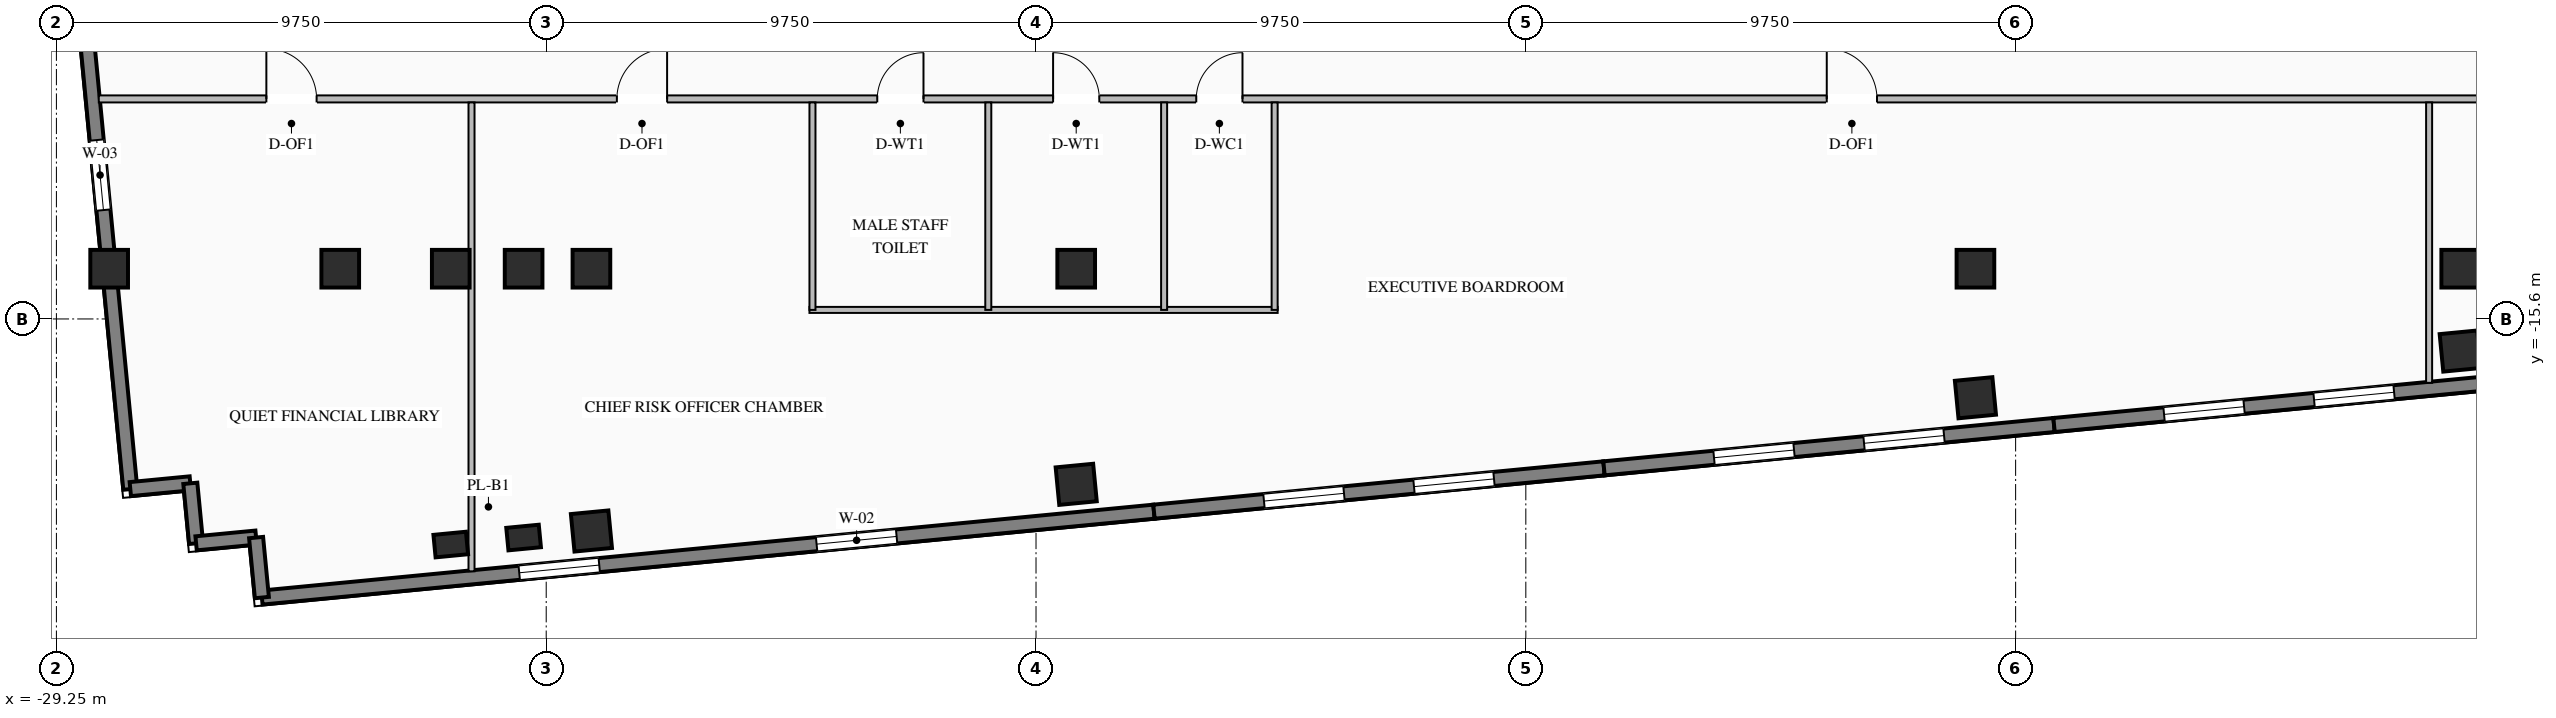
"""IFC4 building model, lengths in metres.
Left out: names, types, materials, properties, quantities, classifications, styles, units other than length and angle.
Written with IfcOpenShell. Run it as: python <this file> out.ifc"""

import sys

from ifc_helpers import new_model, si_unit, direction, frame, frame_2d, origin, origin_2d, place, context, subcontext, project, spatial, rectangle, i_section, extrude, element, fill, save


model = new_model("IFC4")
c1 = context("Model", 3, precision=1e-05, world=origin(), true_north=direction((0.0, 1.0)))
c2 = subcontext(c1, "Body", "Model", "MODEL_VIEW")
j1 = project(units=[si_unit("LENGTHUNIT", "METRE"), si_unit("PLANEANGLEUNIT", "RADIAN")], contexts=[c1])
p1 = place(None, origin())
s1 = spatial("IfcSite", under=j1, at=p1, CompositionType="ELEMENT")
p2 = place(p1, origin())
s2 = spatial("IfcBuilding", under=s1, at=p2, CompositionType="ELEMENT")
p3 = place(p2, frame((0.0, 0.0, 74.2)))
s3 = spatial("IfcBuildingStorey", under=s2, at=p3, CompositionType="ELEMENT", Elevation=74.2)
for number, where, z_axis, x_axis in (
    (1, (-21.4, -14.6, 0.0), (0.0, 0.0, 1.0), (1.0, 0.0, 0.0)),
    (2, (-19.95, -14.6, 0.0), (0.0, 0.0, 1.0), (1.0, 0.0, 0.0)),
    (3, (-18.6, -14.6, 0.0), (0.0, 0.0, 1.0), (1.0, 0.0, 0.0)),
    (4, (-8.95, -14.6, 0.0), (0.0, 0.0, 1.0), (1.0, 0.0, 0.0)),
    (5, (8.95, -14.6, 0.0), (0.0, 0.0, 1.0), (1.0, 0.0, 0.0)),
    (6, (18.6, -14.6, 0.0), (0.0, 0.0, 1.0), (1.0, 0.0, 0.0)),
    (7, (-23.6, -14.6, 0.0), (0.0, 0.0, 1.0), (1.0, 0.0, 0.0)),
    (8, (-28.2, -14.6, 0.0), (0.0, 0.0, 1.0), (1.0, 0.0, 0.0)),
    (9, (-18.6, -19.821, 0.0), (0.0, 0.0, 1.0), (0.995, 0.096, 0.0)),
    (10, (-8.95, -18.892, 0.0), (0.0, 0.0, 1.0), (0.995, 0.096, 0.0)),
    (11, (8.95, -17.168, 0.0), (0.0, 0.0, 1.0), (0.995, 0.096, 0.0)),
    (12, (18.6, -16.239, 0.0), (0.0, 0.0, 1.0), (0.995, 0.096, 0.0)),
):
    element("IfcColumn", number, at=place(p3, frame(where, z_axis=z_axis, x_axis=x_axis)), inside=s3, PredefinedType="COLUMN", context=c2, shape_type="SweptSolid", body=[
        extrude(i_section(OverallWidth=0.75, OverallDepth=0.75, WebThickness=0.03, FlangeThickness=0.044, at=origin_2d()), origin(), (0.0, 0.0, 1.0), 3.45),
    ])
for number, where, z_axis, x_axis in (
    (13, (-21.4, -20.091, 0.0), (0.0, 0.0, 1.0), (0.995, 0.096, 0.0)),
    (14, (-19.95, -19.951, 0.0), (0.0, 0.0, 1.0), (0.995, 0.096, 0.0)),
):
    element("IfcColumn", number, at=place(p3, frame(where, z_axis=z_axis, x_axis=x_axis)), inside=s3, PredefinedType="PILASTER", context=c2, shape_type="SweptSolid", body=[
        extrude(rectangle(XDim=0.65, YDim=0.45, at=origin_2d()), origin(), (0.0, 0.0, 1.0), 3.45),
    ])
p4 = place(p3, frame((-7.402, -19.436, 0.0), z_axis=(0.0, 0.0, 1.0), x_axis=(-0.995395780835, -0.095850088663, 0.0)))
e15 = element("IfcWall", 15, at=p4, inside=s3, PredefinedType="STANDARD", context=c2, shape_type="SweptSolid", body=[
    extrude(rectangle(XDim=17.84, YDim=0.28, at=frame_2d((8.92, 0.0))), origin(), (0.0, 0.0, 1.0), 3.25),
])
p5 = place(p4, frame((5.147, 0.0, 0.76)))
e16 = element("IfcOpeningElement", 16, at=p5, cuts=e15, PredefinedType="OPENING", context=c2, shape_type="SweptSolid", body=[
    extrude(rectangle(XDim=1.6, YDim=1.95, at=frame_2d((0.8, 0.975))), frame((0.0, 0.15, 0.0), z_axis=(0.0, -1.0, 0.0), x_axis=(1.0, 0.0, 0.0)), (0.0, 0.0, 1.0), 0.3),
])
p6 = place(p4, frame((11.093, 0.0, 0.76)))
e17 = element("IfcOpeningElement", 17, at=p6, cuts=e15, PredefinedType="OPENING", context=c2, shape_type="SweptSolid", body=[
    extrude(rectangle(XDim=1.6, YDim=1.95, at=frame_2d((0.8, 0.975))), frame((0.0, 0.15, 0.0), z_axis=(0.0, -1.0, 0.0), x_axis=(1.0, 0.0, 0.0)), (0.0, 0.0, 1.0), 0.3),
])
p7 = place(p3, frame((1.556, -18.573, 0.0), z_axis=(0.0, 0.0, 1.0), x_axis=(-0.995396794462, -0.09583956164, 0.0)))
e18 = element("IfcWall", 18, at=p7, inside=s3, PredefinedType="STANDARD", context=c2, shape_type="SweptSolid", body=[
    extrude(rectangle(XDim=9.0, YDim=0.28, at=frame_2d((4.5, 0.0))), origin(), (0.0, 0.0, 1.0), 3.25),
])
p8 = place(p7, frame((2.2, 0.0, 0.76)))
e19 = element("IfcOpeningElement", 19, at=p8, cuts=e18, PredefinedType="OPENING", context=c2, shape_type="SweptSolid", body=[
    extrude(rectangle(XDim=1.6, YDim=1.95, at=frame_2d((0.8, 0.975))), frame((0.0, 0.15, 0.0), z_axis=(0.0, -1.0, 0.0), x_axis=(1.0, 0.0, 0.0)), (0.0, 0.0, 1.0), 0.3),
])
p9 = place(p7, frame((5.2, 0.0, 0.76)))
e20 = element("IfcOpeningElement", 20, at=p9, cuts=e18, PredefinedType="OPENING", context=c2, shape_type="SweptSolid", body=[
    extrude(rectangle(XDim=1.6, YDim=1.95, at=frame_2d((0.8, 0.975))), frame((0.0, 0.15, 0.0), z_axis=(0.0, -1.0, 0.0), x_axis=(1.0, 0.0, 0.0)), (0.0, 0.0, 1.0), 0.3),
])
p10 = place(p3, frame((10.515, -17.711, 0.0), z_axis=(0.0, 0.0, 1.0), x_axis=(-0.995397043619, -0.095836973841, 0.0)))
e21 = element("IfcWall", 21, at=p10, inside=s3, PredefinedType="STANDARD", context=c2, shape_type="SweptSolid", body=[
    extrude(rectangle(XDim=9.0, YDim=0.28, at=frame_2d((4.5, 0.0))), origin(), (0.0, 0.0, 1.0), 3.25),
])
p11 = place(p10, frame((2.2, 0.0, 0.76)))
e22 = element("IfcOpeningElement", 22, at=p11, cuts=e21, PredefinedType="OPENING", context=c2, shape_type="SweptSolid", body=[
    extrude(rectangle(XDim=1.6, YDim=1.95, at=frame_2d((0.8, 0.975))), frame((0.0, 0.15, 0.0), z_axis=(0.0, -1.0, 0.0), x_axis=(1.0, 0.0, 0.0)), (0.0, 0.0, 1.0), 0.3),
])
p12 = place(p10, frame((5.2, 0.0, 0.76)))
e23 = element("IfcOpeningElement", 23, at=p12, cuts=e21, PredefinedType="OPENING", context=c2, shape_type="SweptSolid", body=[
    extrude(rectangle(XDim=1.6, YDim=1.95, at=frame_2d((0.8, 0.975))), frame((0.0, 0.15, 0.0), z_axis=(0.0, -1.0, 0.0), x_axis=(1.0, 0.0, 0.0)), (0.0, 0.0, 1.0), 0.3),
])
p13 = place(p3, frame((19.474, -16.848, 0.0), z_axis=(0.0, 0.0, 1.0), x_axis=(-0.995396794462, -0.09583956164, 0.0)))
e24 = element("IfcWall", 24, at=p13, inside=s3, PredefinedType="STANDARD", context=c2, shape_type="SweptSolid", body=[
    extrude(rectangle(XDim=9.0, YDim=0.28, at=frame_2d((4.5, 0.0))), origin(), (0.0, 0.0, 1.0), 3.25),
])
p14 = place(p13, frame((2.2, 0.0, 0.76)))
e25 = element("IfcOpeningElement", 25, at=p14, cuts=e24, PredefinedType="OPENING", context=c2, shape_type="SweptSolid", body=[
    extrude(rectangle(XDim=1.6, YDim=1.95, at=frame_2d((0.8, 0.975))), frame((0.0, 0.15, 0.0), z_axis=(0.0, -1.0, 0.0), x_axis=(1.0, 0.0, 0.0)), (0.0, 0.0, 1.0), 0.3),
])
p15 = place(p13, frame((5.2, 0.0, 0.76)))
e26 = element("IfcOpeningElement", 26, at=p15, cuts=e24, PredefinedType="OPENING", context=c2, shape_type="SweptSolid", body=[
    extrude(rectangle(XDim=1.6, YDim=1.95, at=frame_2d((0.8, 0.975))), frame((0.0, 0.15, 0.0), z_axis=(0.0, -1.0, 0.0), x_axis=(1.0, 0.0, 0.0)), (0.0, 0.0, 1.0), 0.3),
])
p16 = place(p3, frame((-27.779, -18.987, 0.0), z_axis=(0.0, 0.0, 1.0), x_axis=(-0.095842534142, 0.995396508256, 0.0)))
e27 = element("IfcWall", 27, at=p16, inside=s3, PredefinedType="STANDARD", context=c2, shape_type="SweptSolid", body=[
    extrude(rectangle(XDim=18.84, YDim=0.28, at=frame_2d((9.42, 0.0))), origin(), (0.0, 0.0, 1.0), 3.25),
])
p17 = place(p16, frame((5.58, 0.0, 0.76)))
e28 = element("IfcOpeningElement", 28, at=p17, cuts=e27, PredefinedType="OPENING", context=c2, shape_type="SweptSolid", body=[
    extrude(rectangle(XDim=1.4, YDim=1.95, at=frame_2d((0.7, 0.975))), frame((0.0, 0.15, 0.0), z_axis=(0.0, -1.0, 0.0), x_axis=(1.0, 0.0, 0.0)), (0.0, 0.0, 1.0), 0.3),
])
p18 = place(p16, frame((11.86, 0.0, 0.76)))
e29 = element("IfcOpeningElement", 29, at=p18, cuts=e27, PredefinedType="OPENING", context=c2, shape_type="SweptSolid", body=[
    extrude(rectangle(XDim=1.4, YDim=1.95, at=frame_2d((0.7, 0.975))), frame((0.0, 0.15, 0.0), z_axis=(0.0, -1.0, 0.0), x_axis=(1.0, 0.0, 0.0)), (0.0, 0.0, 1.0), 0.3),
])
for number, where, z_axis, x_axis in (
    (30, (-27.779, -18.987, 0.0), (0.0, 0.0, 1.0), (0.995, 0.096, 0.0)),
    (31, (-26.584, -18.872, 0.0), (0.0, 0.0, 1.0), (0.096, -0.995, 0.0)),
    (32, (-26.469, -20.067, 0.0), (0.0, 0.0, 1.0), (0.995, 0.096, 0.0)),
):
    element("IfcWall", number, at=place(p3, frame(where, z_axis=z_axis, x_axis=x_axis)), inside=s3, PredefinedType="STANDARD", context=c2, shape_type="SweptSolid", body=[
        extrude(rectangle(XDim=1.2, YDim=0.28, at=frame_2d((0.6, 0.0))), origin(), (0.0, 0.0, 1.0), 3.25),
    ])
p19 = place(p3, frame((-25.275, -19.952, 0.0), z_axis=(0.0, 0.0, 1.0), x_axis=(0.095836473879, -0.995397091755, 0.0)))
e33 = element("IfcWall", 33, at=p19, inside=s3, PredefinedType="STANDARD", context=c2, shape_type="SweptSolid", body=[
    extrude(rectangle(XDim=1.2, YDim=0.28, at=frame_2d((0.6, 0.0))), origin(), (0.0, 0.0, 1.0), 3.25),
])
p20 = place(p3, frame((-28.406, -11.22, 0.0), z_axis=(0.0, 0.0, 1.0), x_axis=(1.0, 0.0, 0.0)))
e34 = element("IfcWall", 34, at=p20, inside=s3, PredefinedType="STANDARD", context=c2, shape_type="SweptSolid", body=[
    extrude(rectangle(XDim=67.551, YDim=0.14, at=frame_2d((33.775, 0.0))), origin(), (0.0, 0.0, 1.0), 2.745),
])
p21 = place(p20, frame((15.496, 0.0, 0.0)))
e35 = element("IfcOpeningElement", 35, at=p21, cuts=e34, PredefinedType="OPENING", context=c2, shape_type="SweptSolid", body=[
    extrude(rectangle(XDim=0.92, YDim=2.08, at=frame_2d((0.46, 1.04))), frame((0.0, 0.08, 0.0), z_axis=(0.0, -1.0, 0.0), x_axis=(1.0, 0.0, 0.0)), (0.0, 0.0, 1.0), 0.16),
])
p22 = place(p20, frame((18.996, 0.0, 0.0)))
e36 = element("IfcOpeningElement", 36, at=p22, cuts=e34, PredefinedType="OPENING", context=c2, shape_type="SweptSolid", body=[
    extrude(rectangle(XDim=0.92, YDim=2.08, at=frame_2d((0.46, 1.04))), frame((0.0, 0.08, 0.0), z_axis=(0.0, -1.0, 0.0), x_axis=(1.0, 0.0, 0.0)), (0.0, 0.0, 1.0), 0.16),
])
p23 = place(p20, frame((21.846, 0.0, 0.0)))
e37 = element("IfcOpeningElement", 37, at=p23, cuts=e34, PredefinedType="OPENING", context=c2, shape_type="SweptSolid", body=[
    extrude(rectangle(XDim=0.92, YDim=2.08, at=frame_2d((0.46, 1.04))), frame((0.0, 0.08, 0.0), z_axis=(0.0, -1.0, 0.0), x_axis=(1.0, 0.0, 0.0)), (0.0, 0.0, 1.0), 0.16),
])
p24 = place(p20, frame((3.336, 0.0, 0.0)))
e38 = element("IfcOpeningElement", 38, at=p24, cuts=e34, PredefinedType="OPENING", context=c2, shape_type="SweptSolid", body=[
    extrude(rectangle(XDim=1.0, YDim=2.08, at=frame_2d((0.5, 1.04))), frame((0.0, 0.08, 0.0), z_axis=(0.0, -1.0, 0.0), x_axis=(1.0, 0.0, 0.0)), (0.0, 0.0, 1.0), 0.16),
])
p25 = place(p20, frame((10.313, 0.0, 0.0)))
e39 = element("IfcOpeningElement", 39, at=p25, cuts=e34, PredefinedType="OPENING", context=c2, shape_type="SweptSolid", body=[
    extrude(rectangle(XDim=1.0, YDim=2.08, at=frame_2d((0.5, 1.04))), frame((0.0, 0.08, 0.0), z_axis=(0.0, -1.0, 0.0), x_axis=(1.0, 0.0, 0.0)), (0.0, 0.0, 1.0), 0.16),
])
p26 = place(p20, frame((34.397, 0.0, 0.0)))
e40 = element("IfcOpeningElement", 40, at=p26, cuts=e34, PredefinedType="OPENING", context=c2, shape_type="SweptSolid", body=[
    extrude(rectangle(XDim=1.0, YDim=2.08, at=frame_2d((0.5, 1.04))), frame((0.0, 0.08, 0.0), z_axis=(0.0, -1.0, 0.0), x_axis=(1.0, 0.0, 0.0)), (0.0, 0.0, 1.0), 0.16),
])
p27 = place(p20, frame((56.343, 0.0, 0.0)))
e41 = element("IfcOpeningElement", 41, at=p27, cuts=e34, PredefinedType="OPENING", context=c2, shape_type="SweptSolid", body=[
    extrude(rectangle(XDim=1.0, YDim=2.08, at=frame_2d((0.5, 1.04))), frame((0.0, 0.08, 0.0), z_axis=(0.0, -1.0, 0.0), x_axis=(1.0, 0.0, 0.0)), (0.0, 0.0, 1.0), 0.16),
])
p28 = place(p3, frame((-14.26, -15.42, 0.0), z_axis=(0.0, 0.0, 1.0), x_axis=(1.0, 0.0, 0.0)))
e42 = element("IfcWall", 42, at=p28, inside=s3, PredefinedType="STANDARD", context=c2, shape_type="SweptSolid", body=[
    extrude(rectangle(XDim=9.32, YDim=0.12, at=frame_2d((4.66, 0.0))), origin(), (0.0, 0.0, 1.0), 3.25),
])
for number, where, z_axis, x_axis in (
    (43, (-14.2, -15.42, 0.0), (0.0, 0.0, 1.0), (0.0, 1.0, 0.0)),
    (44, (-10.7, -15.42, 0.0), (0.0, 0.0, 1.0), (0.0, 1.0, 0.0)),
    (45, (-7.2, -15.42, 0.0), (0.0, 0.0, 1.0), (0.0, 1.0, 0.0)),
    (46, (-5.0, -15.42, 0.0), (0.0, 0.0, 1.0), (0.0, 1.0, 0.0)),
):
    element("IfcWall", number, at=place(p3, frame(where, z_axis=z_axis, x_axis=x_axis)), inside=s3, PredefinedType="STANDARD", context=c2, shape_type="SweptSolid", body=[
        extrude(rectangle(XDim=4.13, YDim=0.12, at=frame_2d((2.065, 0.0))), origin(), (0.0, 0.0, 1.0), 3.25),
    ])
p29 = place(p3, frame((-20.987, -20.624, 0.0), z_axis=(0.0, 0.0, 1.0), x_axis=(0.0, 1.0, 0.0)))
e47 = element("IfcWall", 47, at=p29, inside=s3, PredefinedType="STANDARD", context=c2, shape_type="SweptSolid", body=[
    extrude(rectangle(XDim=9.334, YDim=0.12, at=frame_2d((4.667, 0.0))), origin(), (0.0, 0.0, 1.0), 3.25),
])
p30 = place(p3, frame((17.981, -16.872, 0.0), z_axis=(0.0, 0.0, 1.0), x_axis=(0.0, 1.0, 0.0)))
e48 = element("IfcWall", 48, at=p30, inside=s3, PredefinedType="STANDARD", context=c2, shape_type="SweptSolid", body=[
    extrude(rectangle(XDim=5.582, YDim=0.12, at=frame_2d((2.791, 0.0))), origin(), (0.0, 0.0, 1.0), 3.25),
])
p31 = place(p5, origin())
e49 = element("IfcWindow", 49, at=p31, inside=s3, PartitioningType="SINGLE_PANEL", PredefinedType="WINDOW", context=c2, shape_type="SweptSolid", body=[
    extrude(rectangle(XDim=1.6, YDim=1.95, at=frame_2d((0.8, 0.975))), frame((0.0, 0.03, 0.0), z_axis=(0.0, -1.0, 0.0), x_axis=(1.0, 0.0, 0.0)), (0.0, 0.0, 1.0), 0.06),
])
fill(e16, e49)
p32 = place(p6, origin())
e50 = element("IfcWindow", 50, at=p32, inside=s3, PartitioningType="SINGLE_PANEL", PredefinedType="WINDOW", context=c2, shape_type="SweptSolid", body=[
    extrude(rectangle(XDim=1.6, YDim=1.95, at=frame_2d((0.8, 0.975))), frame((0.0, 0.03, 0.0), z_axis=(0.0, -1.0, 0.0), x_axis=(1.0, 0.0, 0.0)), (0.0, 0.0, 1.0), 0.06),
])
fill(e17, e50)
p33 = place(p8, origin())
e51 = element("IfcWindow", 51, at=p33, inside=s3, PartitioningType="SINGLE_PANEL", PredefinedType="WINDOW", context=c2, shape_type="SweptSolid", body=[
    extrude(rectangle(XDim=1.6, YDim=1.95, at=frame_2d((0.8, 0.975))), frame((0.0, 0.03, 0.0), z_axis=(0.0, -1.0, 0.0), x_axis=(1.0, 0.0, 0.0)), (0.0, 0.0, 1.0), 0.06),
])
fill(e19, e51)
p34 = place(p9, origin())
e52 = element("IfcWindow", 52, at=p34, inside=s3, PartitioningType="SINGLE_PANEL", PredefinedType="WINDOW", context=c2, shape_type="SweptSolid", body=[
    extrude(rectangle(XDim=1.6, YDim=1.95, at=frame_2d((0.8, 0.975))), frame((0.0, 0.03, 0.0), z_axis=(0.0, -1.0, 0.0), x_axis=(1.0, 0.0, 0.0)), (0.0, 0.0, 1.0), 0.06),
])
fill(e20, e52)
p35 = place(p11, origin())
e53 = element("IfcWindow", 53, at=p35, inside=s3, PartitioningType="SINGLE_PANEL", PredefinedType="WINDOW", context=c2, shape_type="SweptSolid", body=[
    extrude(rectangle(XDim=1.6, YDim=1.95, at=frame_2d((0.8, 0.975))), frame((0.0, 0.03, 0.0), z_axis=(0.0, -1.0, 0.0), x_axis=(1.0, 0.0, 0.0)), (0.0, 0.0, 1.0), 0.06),
])
fill(e22, e53)
p36 = place(p12, origin())
e54 = element("IfcWindow", 54, at=p36, inside=s3, PartitioningType="SINGLE_PANEL", PredefinedType="WINDOW", context=c2, shape_type="SweptSolid", body=[
    extrude(rectangle(XDim=1.6, YDim=1.95, at=frame_2d((0.8, 0.975))), frame((0.0, 0.03, 0.0), z_axis=(0.0, -1.0, 0.0), x_axis=(1.0, 0.0, 0.0)), (0.0, 0.0, 1.0), 0.06),
])
fill(e23, e54)
p37 = place(p14, origin())
e55 = element("IfcWindow", 55, at=p37, inside=s3, PartitioningType="SINGLE_PANEL", PredefinedType="WINDOW", context=c2, shape_type="SweptSolid", body=[
    extrude(rectangle(XDim=1.6, YDim=1.95, at=frame_2d((0.8, 0.975))), frame((0.0, 0.03, 0.0), z_axis=(0.0, -1.0, 0.0), x_axis=(1.0, 0.0, 0.0)), (0.0, 0.0, 1.0), 0.06),
])
fill(e25, e55)
p38 = place(p15, origin())
e56 = element("IfcWindow", 56, at=p38, inside=s3, PartitioningType="SINGLE_PANEL", PredefinedType="WINDOW", context=c2, shape_type="SweptSolid", body=[
    extrude(rectangle(XDim=1.6, YDim=1.95, at=frame_2d((0.8, 0.975))), frame((0.0, 0.03, 0.0), z_axis=(0.0, -1.0, 0.0), x_axis=(1.0, 0.0, 0.0)), (0.0, 0.0, 1.0), 0.06),
])
fill(e26, e56)
p39 = place(p17, origin())
e57 = element("IfcWindow", 57, at=p39, inside=s3, PartitioningType="SINGLE_PANEL", PredefinedType="WINDOW", context=c2, shape_type="SweptSolid", body=[
    extrude(rectangle(XDim=1.4, YDim=1.95, at=frame_2d((0.7, 0.975))), frame((0.0, 0.03, 0.0), z_axis=(0.0, -1.0, 0.0), x_axis=(1.0, 0.0, 0.0)), (0.0, 0.0, 1.0), 0.06),
])
fill(e28, e57)
p40 = place(p21, origin())
e58 = element("IfcDoor", 58, at=p40, inside=s3, OperationType="SINGLE_SWING_RIGHT", PredefinedType="DOOR", context=c2, shape_type="SweptSolid", body=[
    extrude(rectangle(XDim=0.92, YDim=2.08, at=frame_2d((0.46, 1.04))), frame((0.0, 0.025, 0.0), z_axis=(0.0, -1.0, 0.0), x_axis=(1.0, 0.0, 0.0)), (0.0, 0.0, 1.0), 0.05),
])
fill(e35, e58)
p41 = place(p22, origin())
e59 = element("IfcDoor", 59, at=p41, inside=s3, OperationType="SINGLE_SWING_LEFT", PredefinedType="DOOR", context=c2, shape_type="SweptSolid", body=[
    extrude(rectangle(XDim=0.92, YDim=2.08, at=frame_2d((0.46, 1.04))), frame((0.0, 0.025, 0.0), z_axis=(0.0, -1.0, 0.0), x_axis=(1.0, 0.0, 0.0)), (0.0, 0.0, 1.0), 0.05),
])
fill(e36, e59)
p42 = place(p23, origin())
e60 = element("IfcDoor", 60, at=p42, inside=s3, OperationType="SINGLE_SWING_RIGHT", PredefinedType="DOOR", context=c2, shape_type="SweptSolid", body=[
    extrude(rectangle(XDim=0.92, YDim=2.08, at=frame_2d((0.46, 1.04))), frame((0.0, 0.025, 0.0), z_axis=(0.0, -1.0, 0.0), x_axis=(1.0, 0.0, 0.0)), (0.0, 0.0, 1.0), 0.05),
])
fill(e37, e60)
p43 = place(p24, origin())
e61 = element("IfcDoor", 61, at=p43, inside=s3, OperationType="SINGLE_SWING_LEFT", PredefinedType="DOOR", context=c2, shape_type="SweptSolid", body=[
    extrude(rectangle(XDim=1.0, YDim=2.08, at=frame_2d((0.5, 1.04))), frame((0.0, 0.025, 0.0), z_axis=(0.0, -1.0, 0.0), x_axis=(1.0, 0.0, 0.0)), (0.0, 0.0, 1.0), 0.05),
])
fill(e38, e61)
p44 = place(p25, origin())
e62 = element("IfcDoor", 62, at=p44, inside=s3, OperationType="SINGLE_SWING_RIGHT", PredefinedType="DOOR", context=c2, shape_type="SweptSolid", body=[
    extrude(rectangle(XDim=1.0, YDim=2.08, at=frame_2d((0.5, 1.04))), frame((0.0, 0.025, 0.0), z_axis=(0.0, -1.0, 0.0), x_axis=(1.0, 0.0, 0.0)), (0.0, 0.0, 1.0), 0.05),
])
fill(e39, e62)
p45 = place(p26, origin())
e63 = element("IfcDoor", 63, at=p45, inside=s3, OperationType="SINGLE_SWING_LEFT", PredefinedType="DOOR", context=c2, shape_type="SweptSolid", body=[
    extrude(rectangle(XDim=1.0, YDim=2.08, at=frame_2d((0.5, 1.04))), frame((0.0, 0.025, 0.0), z_axis=(0.0, -1.0, 0.0), x_axis=(1.0, 0.0, 0.0)), (0.0, 0.0, 1.0), 0.05),
])
fill(e40, e63)
save(model, sys.argv[1])
